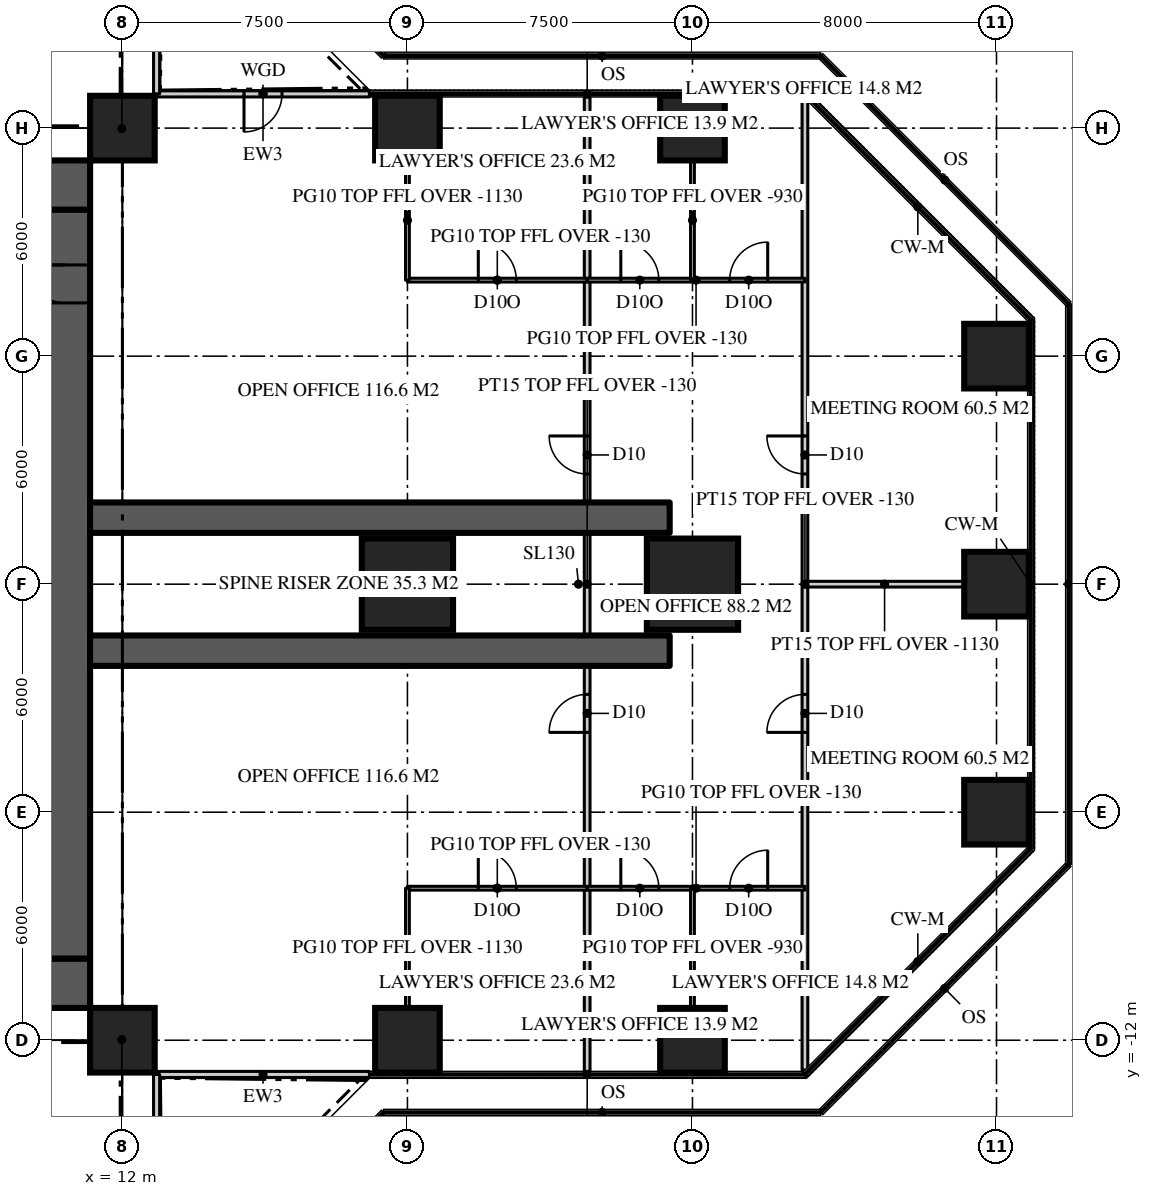
"""IFC4 building model, lengths in metres.
Left out: names, types, materials, properties, quantities, classifications, styles, units other than length and angle.
Written with IfcOpenShell. Run it as: python <this file> out.ifc"""

import sys

from ifc_helpers import new_model, si_unit, direction, frame, frame_2d, origin, origin_2d, place, context, subcontext, project, spatial, rectangle, extrude, element, fill, save


model = new_model("IFC4")
c1 = context("Model", 3, precision=1e-05, world=origin(), true_north=direction((0.0, 1.0)))
c2 = subcontext(c1, "Body", "Model", "MODEL_VIEW")
j1 = project(units=[si_unit("LENGTHUNIT", "METRE"), si_unit("PLANEANGLEUNIT", "RADIAN")], contexts=[c1])
p1 = place(None, origin())
s1 = spatial("IfcSite", under=j1, at=p1, CompositionType="ELEMENT")
p2 = place(p1, origin())
s2 = spatial("IfcBuilding", under=s1, at=p2, CompositionType="ELEMENT")
p3 = place(p2, frame((0.0, 0.0, 143.7)))
s3 = spatial("IfcBuildingStorey", under=s2, at=p3, CompositionType="ELEMENT", Elevation=143.7)
p4 = place(p3, frame((-11.15, 10.5, 0.0), z_axis=(0.0, 0.0, 1.0), x_axis=(1.0, 0.0, 0.0)))
e1 = element("IfcWall", 1, at=p4, inside=s3, PredefinedType="SHEAR", context=c2, shape_type="SweptSolid", body=[
    extrude(rectangle(XDim=22.3, YDim=1.3, at=frame_2d((11.15, 0.0))), origin(), (0.0, 0.0, 1.0), 3.9),
])
p5 = place(p4, frame((4.25, 0.0, 0.0)))
e2 = element("IfcOpeningElement", 2, at=p5, cuts=e1, PredefinedType="OPENING", context=c2, shape_type="SweptSolid", body=[
    extrude(rectangle(XDim=1.8, YDim=2.2, at=frame_2d((0.9, 1.1))), frame((0.0, 0.66, 0.0), z_axis=(0.0, -1.0, 0.0), x_axis=(1.0, 0.0, 0.0)), (0.0, 0.0, 1.0), 1.32),
])
p6 = place(p4, frame((16.25, 0.0, 0.0)))
e3 = element("IfcOpeningElement", 3, at=p6, cuts=e1, PredefinedType="OPENING", context=c2, shape_type="SweptSolid", body=[
    extrude(rectangle(XDim=1.8, YDim=2.2, at=frame_2d((0.9, 1.1))), frame((0.0, 0.66, 0.0), z_axis=(0.0, -1.0, 0.0), x_axis=(1.0, 0.0, 0.0)), (0.0, 0.0, 1.0), 1.32),
])
p7 = place(p3, frame((11.15, -10.5, 0.0), z_axis=(0.0, 0.0, 1.0), x_axis=(-1.0, 0.0, 0.0)))
e4 = element("IfcWall", 4, at=p7, inside=s3, PredefinedType="SHEAR", context=c2, shape_type="SweptSolid", body=[
    extrude(rectangle(XDim=22.3, YDim=1.3, at=frame_2d((11.15, 0.0))), origin(), (0.0, 0.0, 1.0), 3.9),
])
p8 = place(p7, frame((16.25, 0.0, 0.0)))
e5 = element("IfcOpeningElement", 5, at=p8, cuts=e4, PredefinedType="OPENING", context=c2, shape_type="SweptSolid", body=[
    extrude(rectangle(XDim=1.8, YDim=2.2, at=frame_2d((0.9, 1.1))), frame((0.0, 0.66, 0.0), z_axis=(0.0, -1.0, 0.0), x_axis=(1.0, 0.0, 0.0)), (0.0, 0.0, 1.0), 1.32),
])
p9 = place(p7, frame((4.25, 0.0, 0.0)))
e6 = element("IfcOpeningElement", 6, at=p9, cuts=e4, PredefinedType="OPENING", context=c2, shape_type="SweptSolid", body=[
    extrude(rectangle(XDim=1.8, YDim=2.2, at=frame_2d((0.9, 1.1))), frame((0.0, 0.66, 0.0), z_axis=(0.0, -1.0, 0.0), x_axis=(1.0, 0.0, 0.0)), (0.0, 0.0, 1.0), 1.32),
])
p10 = place(p3, frame((10.5, -9.85, 0.0), z_axis=(0.0, 0.0, 1.0), x_axis=(0.0, 1.0, 0.0)))
e7 = element("IfcWall", 7, at=p10, inside=s3, PredefinedType="SHEAR", context=c2, shape_type="SweptSolid", body=[
    extrude(rectangle(XDim=19.7, YDim=1.3, at=frame_2d((9.85, 0.0))), origin(), (0.0, 0.0, 1.0), 3.9),
])
p11 = place(p10, frame((17.25, 0.0, 0.0)))
e8 = element("IfcOpeningElement", 8, at=p11, cuts=e7, PredefinedType="OPENING", context=c2, shape_type="SweptSolid", body=[
    extrude(rectangle(XDim=1.0, YDim=2.2, at=frame_2d((0.5, 1.1))), frame((0.0, 0.66, 0.0), z_axis=(0.0, -1.0, 0.0), x_axis=(1.0, 0.0, 0.0)), (0.0, 0.0, 1.0), 1.32),
])
for number, where, z_axis, x_axis in (
    (9, (11.15, -1.75, 0.0), (0.0, 0.0, 1.0), (1.0, 0.0, 0.0)),
    (10, (11.15, 1.75, 0.0), (0.0, 0.0, 1.0), (1.0, 0.0, 0.0)),
):
    element("IfcWall", number, at=place(p3, frame(where, z_axis=z_axis, x_axis=x_axis)), inside=s3, PredefinedType="SHEAR", context=c2, shape_type="SweptSolid", body=[
        extrude(rectangle(XDim=15.25, YDim=0.8, at=frame_2d((7.625, 0.0))), origin(), (0.0, 0.0, 1.0), 3.9),
    ])
for number, where, z_axis, x_axis in (
    (11, (12.0, -12.0, 0.0), (0.0, 0.0, 1.0), (1.0, 0.0, 0.0)),
    (12, (19.5, -12.0, 0.0), (0.0, 0.0, 1.0), (1.0, 0.0, 0.0)),
    (13, (27.0, -12.0, 0.0), (0.0, 0.0, 1.0), (1.0, 0.0, 0.0)),
    (14, (35.0, -6.0, 0.0), (0.0, 0.0, 1.0), (1.0, 0.0, 0.0)),
):
    element("IfcColumn", number, at=place(p3, frame(where, z_axis=z_axis, x_axis=x_axis)), inside=s3, PredefinedType="COLUMN", context=c2, shape_type="SweptSolid", body=[
        extrude(rectangle(XDim=1.7, YDim=1.7, at=origin_2d()), origin(), (0.0, 0.0, 1.0), 3.9),
    ])
for number, where, z_axis, x_axis in (
    (15, (19.5, 0.0, 0.0), (0.0, 0.0, 1.0), (1.0, 0.0, 0.0)),
    (16, (27.0, 0.0, 0.0), (0.0, 0.0, 1.0), (1.0, 0.0, 0.0)),
):
    element("IfcColumn", number, at=place(p3, frame(where, z_axis=z_axis, x_axis=x_axis)), inside=s3, PredefinedType="COLUMN", context=c2, shape_type="SweptSolid", body=[
        extrude(rectangle(XDim=2.4, YDim=2.4, at=origin_2d()), origin(), (0.0, 0.0, 1.0), 3.9),
    ])
for number, where, z_axis, x_axis in (
    (17, (35.0, 0.0, 0.0), (0.0, 0.0, 1.0), (1.0, 0.0, 0.0)),
    (18, (35.0, 6.0, 0.0), (0.0, 0.0, 1.0), (1.0, 0.0, 0.0)),
    (19, (12.0, 12.0, 0.0), (0.0, 0.0, 1.0), (1.0, 0.0, 0.0)),
    (20, (19.5, 12.0, 0.0), (0.0, 0.0, 1.0), (1.0, 0.0, 0.0)),
    (21, (27.0, 12.0, 0.0), (0.0, 0.0, 1.0), (1.0, 0.0, 0.0)),
):
    element("IfcColumn", number, at=place(p3, frame(where, z_axis=z_axis, x_axis=x_axis)), inside=s3, PredefinedType="COLUMN", context=c2, shape_type="SweptSolid", body=[
        extrude(rectangle(XDim=1.7, YDim=1.7, at=origin_2d()), origin(), (0.0, 0.0, 1.0), 3.9),
    ])
p12 = place(p3, frame((12.9, -12.9, 0.0), z_axis=(0.0, 0.0, 1.0), x_axis=(1.0, 0.0, 0.0)))
e22 = element("IfcWall", 22, at=p12, inside=s3, PredefinedType="SOLIDWALL", context=c2, shape_type="SweptSolid", body=[
    extrude(rectangle(XDim=5.6, YDim=0.16, at=frame_2d((2.8, 0.0))), origin(), (0.0, 0.0, 1.0), 3.77),
])
p13 = place(p3, frame((18.5, 12.9, 0.0), z_axis=(0.0, 0.0, 1.0), x_axis=(-1.0, 0.0, 0.0)))
e23 = element("IfcWall", 23, at=p13, inside=s3, PredefinedType="SOLIDWALL", context=c2, shape_type="SweptSolid", body=[
    extrude(rectangle(XDim=5.6, YDim=0.16, at=frame_2d((2.8, 0.0))), origin(), (0.0, 0.0, 1.0), 3.77),
])
p14 = place(p13, frame((2.3, 0.0, 0.0)))
e24 = element("IfcOpeningElement", 24, at=p14, cuts=e23, PredefinedType="OPENING", context=c2, shape_type="SweptSolid", body=[
    extrude(rectangle(XDim=1.0, YDim=2.2, at=frame_2d((0.5, 1.1))), frame((0.0, 0.09, 0.0), z_axis=(0.0, -1.0, 0.0), x_axis=(1.0, 0.0, 0.0)), (0.0, 0.0, 1.0), 0.18),
])
p15 = place(p3, frame((12.9, 12.9, 0.0), z_axis=(0.0, 0.0, 1.0), x_axis=(0.0, 1.0, 0.0)))
e25 = element("IfcWall", 25, at=p15, inside=s3, PredefinedType="SOLIDWALL", context=c2, shape_type="SweptSolid", body=[
    extrude(rectangle(XDim=5.6, YDim=0.16, at=frame_2d((2.8, 0.0))), origin(), (0.0, 0.0, 1.0), 3.77),
])
p16 = place(p3, frame((12.9, -18.5, 0.0), z_axis=(0.0, 0.0, 1.0), x_axis=(0.0, 1.0, 0.0)))
e26 = element("IfcWall", 26, at=p16, inside=s3, PredefinedType="SOLIDWALL", context=c2, shape_type="SweptSolid", body=[
    extrude(rectangle(XDim=5.6, YDim=0.16, at=frame_2d((2.8, 0.0))), origin(), (0.0, 0.0, 1.0), 3.77),
])
p17 = place(p16, frame((2.3, 0.0, 0.0)))
e27 = element("IfcOpeningElement", 27, at=p17, cuts=e26, PredefinedType="OPENING", context=c2, shape_type="SweptSolid", body=[
    extrude(rectangle(XDim=1.0, YDim=2.2, at=frame_2d((0.5, 1.1))), frame((0.0, 0.09, 0.0), z_axis=(0.0, -1.0, 0.0), x_axis=(1.0, 0.0, 0.0)), (0.0, 0.0, 1.0), 0.18),
])
p18 = place(p3, frame((24.229, -12.82, 0.0), z_axis=(0.0, 0.0, 1.0), x_axis=(0.0, 1.0, 0.0)))
e28 = element("IfcWall", 28, at=p18, inside=s3, PredefinedType="PARTITIONING", context=c2, shape_type="SweptSolid", body=[
    extrude(rectangle(XDim=25.64, YDim=0.15, at=frame_2d((12.82, 0.0))), origin(), (0.0, 0.0, 1.0), 3.77),
])
p19 = place(p18, frame((15.72, 0.0, 0.0)))
e29 = element("IfcOpeningElement", 29, at=p19, cuts=e28, PredefinedType="OPENING", context=c2, shape_type="SweptSolid", body=[
    extrude(rectangle(XDim=1.0, YDim=2.2, at=frame_2d((0.5, 1.1))), frame((0.0, 0.085, 0.0), z_axis=(0.0, -1.0, 0.0), x_axis=(1.0, 0.0, 0.0)), (0.0, 0.0, 1.0), 0.17),
])
p20 = place(p18, frame((8.92, 0.0, 0.0)))
e30 = element("IfcOpeningElement", 30, at=p20, cuts=e28, PredefinedType="OPENING", context=c2, shape_type="SweptSolid", body=[
    extrude(rectangle(XDim=1.0, YDim=2.2, at=frame_2d((0.5, 1.1))), frame((0.0, 0.085, 0.0), z_axis=(0.0, -1.0, 0.0), x_axis=(1.0, 0.0, 0.0)), (0.0, 0.0, 1.0), 0.17),
])
p21 = place(p3, frame((29.959, -12.786, 0.0), z_axis=(0.0, 0.0, 1.0), x_axis=(0.0, 1.0, 0.0)))
e31 = element("IfcWall", 31, at=p21, inside=s3, PredefinedType="PARTITIONING", context=c2, shape_type="SweptSolid", body=[
    extrude(rectangle(XDim=25.573, YDim=0.15, at=frame_2d((12.786, 0.0))), origin(), (0.0, 0.0, 1.0), 3.77),
])
p22 = place(p21, frame((15.687, 0.0, 0.0)))
e32 = element("IfcOpeningElement", 32, at=p22, cuts=e31, PredefinedType="OPENING", context=c2, shape_type="SweptSolid", body=[
    extrude(rectangle(XDim=1.0, YDim=2.2, at=frame_2d((0.5, 1.1))), frame((0.0, 0.085, 0.0), z_axis=(0.0, -1.0, 0.0), x_axis=(1.0, 0.0, 0.0)), (0.0, 0.0, 1.0), 0.17),
])
p23 = place(p21, frame((8.886, 0.0, 0.0)))
e33 = element("IfcOpeningElement", 33, at=p23, cuts=e31, PredefinedType="OPENING", context=c2, shape_type="SweptSolid", body=[
    extrude(rectangle(XDim=1.0, YDim=2.2, at=frame_2d((0.5, 1.1))), frame((0.0, 0.085, 0.0), z_axis=(0.0, -1.0, 0.0), x_axis=(1.0, 0.0, 0.0)), (0.0, 0.0, 1.0), 0.17),
])
p24 = place(p3, frame((29.959, 0.0, 0.0), z_axis=(0.0, 0.0, 1.0), x_axis=(1.0, 0.0, 0.0)))
e34 = element("IfcWall", 34, at=p24, inside=s3, PredefinedType="PARTITIONING", context=c2, shape_type="SweptSolid", body=[
    extrude(rectangle(XDim=4.191, YDim=0.15, at=frame_2d((2.095, 0.0))), origin(), (0.0, 0.0, 1.0), 2.77),
])
p25 = place(p3, frame((19.5, 8.0, 0.0), z_axis=(0.0, 0.0, 1.0), x_axis=(1.0, 0.0, 0.0)))
e35 = element("IfcWall", 35, at=p25, inside=s3, PredefinedType="PARTITIONING", context=c2, shape_type="SweptSolid", body=[
    extrude(rectangle(XDim=4.729, YDim=0.1, at=frame_2d((2.365, 0.0))), origin(), (0.0, 0.0, 1.0), 3.77),
])
p26 = place(p25, frame((1.865, 0.0, 0.0)))
e36 = element("IfcOpeningElement", 36, at=p26, cuts=e35, PredefinedType="OPENING", context=c2, shape_type="SweptSolid", body=[
    extrude(rectangle(XDim=1.0, YDim=2.2, at=frame_2d((0.5, 1.1))), frame((0.0, 0.06, 0.0), z_axis=(0.0, -1.0, 0.0), x_axis=(1.0, 0.0, 0.0)), (0.0, 0.0, 1.0), 0.12),
])
p27 = place(p3, frame((24.229, 8.0, 0.0), z_axis=(0.0, 0.0, 1.0), x_axis=(1.0, 0.0, 0.0)))
e37 = element("IfcWall", 37, at=p27, inside=s3, PredefinedType="PARTITIONING", context=c2, shape_type="SweptSolid", body=[
    extrude(rectangle(XDim=5.73, YDim=0.1, at=frame_2d((2.865, 0.0))), origin(), (0.0, 0.0, 1.0), 3.77),
])
p28 = place(p27, frame((0.885, 0.0, 0.0)))
e38 = element("IfcOpeningElement", 38, at=p28, cuts=e37, PredefinedType="OPENING", context=c2, shape_type="SweptSolid", body=[
    extrude(rectangle(XDim=1.0, YDim=2.2, at=frame_2d((0.5, 1.1))), frame((0.0, 0.06, 0.0), z_axis=(0.0, -1.0, 0.0), x_axis=(1.0, 0.0, 0.0)), (0.0, 0.0, 1.0), 0.12),
])
p29 = place(p27, frame((3.75, 0.0, 0.0)))
e39 = element("IfcOpeningElement", 39, at=p29, cuts=e37, PredefinedType="OPENING", context=c2, shape_type="SweptSolid", body=[
    extrude(rectangle(XDim=1.0, YDim=2.2, at=frame_2d((0.5, 1.1))), frame((0.0, 0.06, 0.0), z_axis=(0.0, -1.0, 0.0), x_axis=(1.0, 0.0, 0.0)), (0.0, 0.0, 1.0), 0.12),
])
p30 = place(p3, frame((19.5, 8.0, 0.0), z_axis=(0.0, 0.0, 1.0), x_axis=(0.0, 1.0, 0.0)))
e40 = element("IfcWall", 40, at=p30, inside=s3, PredefinedType="PARTITIONING", context=c2, shape_type="SweptSolid", body=[
    extrude(rectangle(XDim=3.15, YDim=0.1, at=frame_2d((1.575, 0.0))), origin(), (0.0, 0.0, 1.0), 2.77),
])
p31 = place(p3, frame((27.0, 8.0, 0.0), z_axis=(0.0, 0.0, 1.0), x_axis=(0.0, 1.0, 0.0)))
e41 = element("IfcWall", 41, at=p31, inside=s3, PredefinedType="PARTITIONING", context=c2, shape_type="SweptSolid", body=[
    extrude(rectangle(XDim=3.15, YDim=0.1, at=frame_2d((1.575, 0.0))), origin(), (0.0, 0.0, 1.0), 2.97),
])
p32 = place(p3, frame((19.5, -8.0, 0.0), z_axis=(0.0, 0.0, 1.0), x_axis=(1.0, 0.0, 0.0)))
e42 = element("IfcWall", 42, at=p32, inside=s3, PredefinedType="PARTITIONING", context=c2, shape_type="SweptSolid", body=[
    extrude(rectangle(XDim=4.729, YDim=0.1, at=frame_2d((2.365, 0.0))), origin(), (0.0, 0.0, 1.0), 3.77),
])
p33 = place(p32, frame((1.865, 0.0, 0.0)))
e43 = element("IfcOpeningElement", 43, at=p33, cuts=e42, PredefinedType="OPENING", context=c2, shape_type="SweptSolid", body=[
    extrude(rectangle(XDim=1.0, YDim=2.2, at=frame_2d((0.5, 1.1))), frame((0.0, 0.06, 0.0), z_axis=(0.0, -1.0, 0.0), x_axis=(1.0, 0.0, 0.0)), (0.0, 0.0, 1.0), 0.12),
])
p34 = place(p3, frame((24.229, -8.0, 0.0), z_axis=(0.0, 0.0, 1.0), x_axis=(1.0, 0.0, 0.0)))
e44 = element("IfcWall", 44, at=p34, inside=s3, PredefinedType="PARTITIONING", context=c2, shape_type="SweptSolid", body=[
    extrude(rectangle(XDim=5.73, YDim=0.1, at=frame_2d((2.865, 0.0))), origin(), (0.0, 0.0, 1.0), 3.77),
])
p35 = place(p34, frame((0.885, 0.0, 0.0)))
e45 = element("IfcOpeningElement", 45, at=p35, cuts=e44, PredefinedType="OPENING", context=c2, shape_type="SweptSolid", body=[
    extrude(rectangle(XDim=1.0, YDim=2.2, at=frame_2d((0.5, 1.1))), frame((0.0, 0.06, 0.0), z_axis=(0.0, -1.0, 0.0), x_axis=(1.0, 0.0, 0.0)), (0.0, 0.0, 1.0), 0.12),
])
p36 = place(p34, frame((3.75, 0.0, 0.0)))
e46 = element("IfcOpeningElement", 46, at=p36, cuts=e44, PredefinedType="OPENING", context=c2, shape_type="SweptSolid", body=[
    extrude(rectangle(XDim=1.0, YDim=2.2, at=frame_2d((0.5, 1.1))), frame((0.0, 0.06, 0.0), z_axis=(0.0, -1.0, 0.0), x_axis=(1.0, 0.0, 0.0)), (0.0, 0.0, 1.0), 0.12),
])
p37 = place(p3, frame((19.5, -8.0, 0.0), z_axis=(0.0, 0.0, 1.0), x_axis=(0.0, -1.0, 0.0)))
e47 = element("IfcWall", 47, at=p37, inside=s3, PredefinedType="PARTITIONING", context=c2, shape_type="SweptSolid", body=[
    extrude(rectangle(XDim=3.15, YDim=0.1, at=frame_2d((1.575, 0.0))), origin(), (0.0, 0.0, 1.0), 2.77),
])
p38 = place(p3, frame((27.0, -8.0, 0.0), z_axis=(0.0, 0.0, 1.0), x_axis=(0.0, -1.0, 0.0)))
e48 = element("IfcWall", 48, at=p38, inside=s3, PredefinedType="PARTITIONING", context=c2, shape_type="SweptSolid", body=[
    extrude(rectangle(XDim=3.15, YDim=0.1, at=frame_2d((1.575, 0.0))), origin(), (0.0, 0.0, 1.0), 2.97),
])
for number, where, z_axis, x_axis in (
    (49, (11.15, 11.15, 0.0), (0.0, 0.0, 1.0), (0.707, 0.707, 0.0)),
    (50, (11.15, -11.15, 0.0), (0.0, 0.0, 1.0), (0.707, -0.707, 0.0)),
):
    element("IfcWall", number, at=place(p3, frame(where, z_axis=z_axis, x_axis=x_axis)), inside=s3, PredefinedType="PARTITIONING", context=c2, shape_type="SweptSolid", body=[
        extrude(rectangle(XDim=2.362, YDim=0.15, at=frame_2d((1.181, 0.0))), origin(), (0.0, 0.0, 1.0), 3.22),
    ])
p39 = place(p14, origin())
e51 = element("IfcDoor", 51, at=p39, inside=s3, OperationType="SINGLE_SWING_RIGHT", PredefinedType="DOOR", context=c2, shape_type="SweptSolid", body=[
    extrude(rectangle(XDim=1.0, YDim=2.2, at=frame_2d((0.5, 1.1))), frame((0.0, 0.025, 0.0), z_axis=(0.0, -1.0, 0.0), x_axis=(1.0, 0.0, 0.0)), (0.0, 0.0, 1.0), 0.05),
])
fill(e24, e51)
p40 = place(p11, origin())
e52 = element("IfcDoor", 52, at=p40, inside=s3, OperationType="SINGLE_SWING_RIGHT", PredefinedType="DOOR", context=c2, shape_type="SweptSolid", body=[
    extrude(rectangle(XDim=1.0, YDim=2.2, at=frame_2d((0.5, 1.1))), frame((0.0, 0.025, 0.0), z_axis=(0.0, -1.0, 0.0), x_axis=(1.0, 0.0, 0.0)), (0.0, 0.0, 1.0), 0.05),
])
fill(e8, e52)
p41 = place(p19, origin())
e53 = element("IfcDoor", 53, at=p41, inside=s3, OperationType="SINGLE_SWING_RIGHT", PredefinedType="DOOR", context=c2, shape_type="SweptSolid", body=[
    extrude(rectangle(XDim=1.0, YDim=2.2, at=frame_2d((0.5, 1.1))), frame((0.0, 0.025, 0.0), z_axis=(0.0, -1.0, 0.0), x_axis=(1.0, 0.0, 0.0)), (0.0, 0.0, 1.0), 0.05),
])
fill(e29, e53)
p42 = place(p20, origin())
e54 = element("IfcDoor", 54, at=p42, inside=s3, OperationType="SINGLE_SWING_LEFT", PredefinedType="DOOR", context=c2, shape_type="SweptSolid", body=[
    extrude(rectangle(XDim=1.0, YDim=2.2, at=frame_2d((0.5, 1.1))), frame((0.0, 0.025, 0.0), z_axis=(0.0, -1.0, 0.0), x_axis=(1.0, 0.0, 0.0)), (0.0, 0.0, 1.0), 0.05),
])
fill(e30, e54)
p43 = place(p22, origin())
e55 = element("IfcDoor", 55, at=p43, inside=s3, OperationType="SINGLE_SWING_RIGHT", PredefinedType="DOOR", context=c2, shape_type="SweptSolid", body=[
    extrude(rectangle(XDim=1.0, YDim=2.2, at=frame_2d((0.5, 1.1))), frame((0.0, 0.025, 0.0), z_axis=(0.0, -1.0, 0.0), x_axis=(1.0, 0.0, 0.0)), (0.0, 0.0, 1.0), 0.05),
])
fill(e32, e55)
p44 = place(p23, origin())
e56 = element("IfcDoor", 56, at=p44, inside=s3, OperationType="SINGLE_SWING_LEFT", PredefinedType="DOOR", context=c2, shape_type="SweptSolid", body=[
    extrude(rectangle(XDim=1.0, YDim=2.2, at=frame_2d((0.5, 1.1))), frame((0.0, 0.025, 0.0), z_axis=(0.0, -1.0, 0.0), x_axis=(1.0, 0.0, 0.0)), (0.0, 0.0, 1.0), 0.05),
])
fill(e33, e56)
p45 = place(p26, origin())
e57 = element("IfcDoor", 57, at=p45, inside=s3, OperationType="SINGLE_SWING_LEFT", PredefinedType="DOOR", context=c2, shape_type="SweptSolid", body=[
    extrude(rectangle(XDim=1.0, YDim=2.2, at=frame_2d((0.5, 1.1))), frame((0.0, 0.025, 0.0), z_axis=(0.0, -1.0, 0.0), x_axis=(1.0, 0.0, 0.0)), (0.0, 0.0, 1.0), 0.05),
])
fill(e36, e57)
p46 = place(p28, origin())
e58 = element("IfcDoor", 58, at=p46, inside=s3, OperationType="SINGLE_SWING_LEFT", PredefinedType="DOOR", context=c2, shape_type="SweptSolid", body=[
    extrude(rectangle(XDim=1.0, YDim=2.2, at=frame_2d((0.5, 1.1))), frame((0.0, 0.025, 0.0), z_axis=(0.0, -1.0, 0.0), x_axis=(1.0, 0.0, 0.0)), (0.0, 0.0, 1.0), 0.05),
])
fill(e38, e58)
p47 = place(p29, origin())
e59 = element("IfcDoor", 59, at=p47, inside=s3, OperationType="SINGLE_SWING_RIGHT", PredefinedType="DOOR", context=c2, shape_type="SweptSolid", body=[
    extrude(rectangle(XDim=1.0, YDim=2.2, at=frame_2d((0.5, 1.1))), frame((0.0, 0.025, 0.0), z_axis=(0.0, -1.0, 0.0), x_axis=(1.0, 0.0, 0.0)), (0.0, 0.0, 1.0), 0.05),
])
fill(e39, e59)
p48 = place(p33, origin())
e60 = element("IfcDoor", 60, at=p48, inside=s3, OperationType="SINGLE_SWING_LEFT", PredefinedType="DOOR", context=c2, shape_type="SweptSolid", body=[
    extrude(rectangle(XDim=1.0, YDim=2.2, at=frame_2d((0.5, 1.1))), frame((0.0, 0.025, 0.0), z_axis=(0.0, -1.0, 0.0), x_axis=(1.0, 0.0, 0.0)), (0.0, 0.0, 1.0), 0.05),
])
fill(e43, e60)
p49 = place(p35, origin())
e61 = element("IfcDoor", 61, at=p49, inside=s3, OperationType="SINGLE_SWING_LEFT", PredefinedType="DOOR", context=c2, shape_type="SweptSolid", body=[
    extrude(rectangle(XDim=1.0, YDim=2.2, at=frame_2d((0.5, 1.1))), frame((0.0, 0.025, 0.0), z_axis=(0.0, -1.0, 0.0), x_axis=(1.0, 0.0, 0.0)), (0.0, 0.0, 1.0), 0.05),
])
fill(e45, e61)
p50 = place(p36, origin())
e62 = element("IfcDoor", 62, at=p50, inside=s3, OperationType="SINGLE_SWING_RIGHT", PredefinedType="DOOR", context=c2, shape_type="SweptSolid", body=[
    extrude(rectangle(XDim=1.0, YDim=2.2, at=frame_2d((0.5, 1.1))), frame((0.0, 0.025, 0.0), z_axis=(0.0, -1.0, 0.0), x_axis=(1.0, 0.0, 0.0)), (0.0, 0.0, 1.0), 0.05),
])
fill(e46, e62)
save(model, sys.argv[1])
